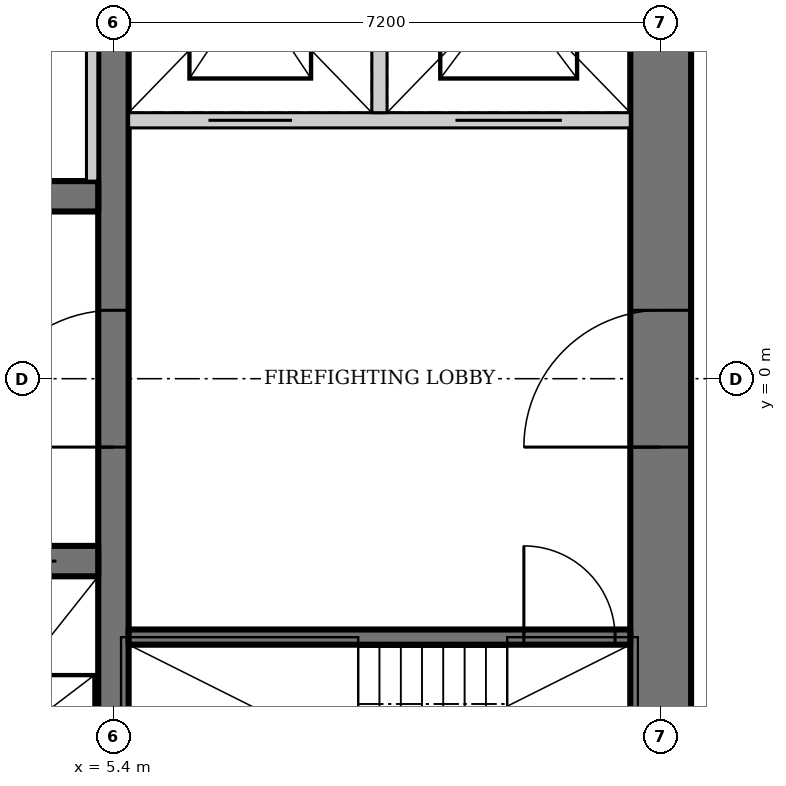
"""IFC4 building model, lengths in metres.
Left out: names, types, materials, properties, quantities, classifications, styles, units other than length and angle.
Written with IfcOpenShell. Run it as: python <this file> out.ifc"""

import sys

from ifc_helpers import new_model, si_unit, direction, frame, frame_2d, origin, place, context, subcontext, project, spatial, rectangle, extrude, element, fill, save


model = new_model("IFC4")
c1 = context("Model", 3, precision=1e-05, world=origin(), true_north=direction((0.0, 1.0)))
c2 = subcontext(c1, "Body", "Model", "MODEL_VIEW")
j1 = project(units=[si_unit("LENGTHUNIT", "METRE"), si_unit("PLANEANGLEUNIT", "RADIAN")], contexts=[c1])
p1 = place(None, origin())
s1 = spatial("IfcSite", under=j1, at=p1, CompositionType="ELEMENT")
p2 = place(p1, origin())
s2 = spatial("IfcBuilding", under=s1, at=p2, CompositionType="ELEMENT")
p3 = place(p2, frame((0.0, 0.0, 279.4)))
s3 = spatial("IfcBuildingStorey", under=s2, at=p3, CompositionType="ELEMENT", Elevation=279.4)
p4 = place(p3, frame((12.6, -11.0, 0.0), z_axis=(0.0, 0.0, 1.0), x_axis=(0.0, 1.0, 0.0)))
e1 = element("IfcWall", 1, at=p4, inside=s3, PredefinedType="SHEAR", context=c2, shape_type="SweptSolid", body=[
    extrude(rectangle(XDim=22.0, YDim=0.8, at=frame_2d((11.0, 0.0))), origin(), (0.0, 0.0, 1.0), 5.0),
])
p5 = place(p4, frame((10.1, 0.0, 0.0)))
e2 = element("IfcOpeningElement", 2, at=p5, cuts=e1, PredefinedType="OPENING", context=c2, shape_type="SweptSolid", body=[
    extrude(rectangle(XDim=1.8, YDim=2.1, at=frame_2d((0.9, 1.05))), frame((0.0, 0.41, 0.0), z_axis=(0.0, -1.0, 0.0), x_axis=(1.0, 0.0, 0.0)), (0.0, 0.0, 1.0), 0.82),
])
p6 = place(p3, frame((5.4, -6.8, 0.0), z_axis=(0.0, 0.0, 1.0), x_axis=(0.0, 1.0, 0.0)))
e3 = element("IfcWall", 3, at=p6, inside=s3, PredefinedType="SHEAR", context=c2, shape_type="SweptSolid", body=[
    extrude(rectangle(XDim=14.6, YDim=0.4, at=frame_2d((7.3, 0.0))), origin(), (0.0, 0.0, 1.0), 5.0),
])
p7 = place(p6, frame((5.9, 0.0, 0.0)))
e4 = element("IfcOpeningElement", 4, at=p7, cuts=e3, PredefinedType="OPENING", context=c2, shape_type="SweptSolid", body=[
    extrude(rectangle(XDim=1.8, YDim=2.1, at=frame_2d((0.9, 1.05))), frame((0.0, 0.21, 0.0), z_axis=(0.0, -1.0, 0.0), x_axis=(1.0, 0.0, 0.0)), (0.0, 0.0, 1.0), 0.42),
])
p8 = place(p3, frame((-5.2, -2.4, 0.0), z_axis=(0.0, 0.0, 1.0), x_axis=(1.0, 0.0, 0.0)))
e5 = element("IfcWall", 5, at=p8, inside=s3, PredefinedType="SHEAR", context=c2, shape_type="SweptSolid", body=[
    extrude(rectangle(XDim=10.4, YDim=0.4, at=frame_2d((5.2, 0.0))), origin(), (0.0, 0.0, 1.0), 5.0),
])
p9 = place(p8, frame((1.683, 0.0, 0.0)))
e6 = element("IfcOpeningElement", 6, at=p9, cuts=e5, PredefinedType="OPENING", context=c2, shape_type="SweptSolid", body=[
    extrude(rectangle(XDim=1.1, YDim=2.2, at=frame_2d((0.55, 1.1))), frame((0.0, 0.21, 0.0), z_axis=(0.0, -1.0, 0.0), x_axis=(1.0, 0.0, 0.0)), (0.0, 0.0, 1.0), 0.42),
])
p10 = place(p8, frame((5.217, 0.0, 0.0)))
e7 = element("IfcOpeningElement", 7, at=p10, cuts=e5, PredefinedType="OPENING", context=c2, shape_type="SweptSolid", body=[
    extrude(rectangle(XDim=1.1, YDim=2.2, at=frame_2d((0.55, 1.1))), frame((0.0, 0.21, 0.0), z_axis=(0.0, -1.0, 0.0), x_axis=(1.0, 0.0, 0.0)), (0.0, 0.0, 1.0), 0.42),
])
p11 = place(p8, frame((8.75, 0.0, 0.0)))
e8 = element("IfcOpeningElement", 8, at=p11, cuts=e5, PredefinedType="OPENING", context=c2, shape_type="SweptSolid", body=[
    extrude(rectangle(XDim=1.1, YDim=2.2, at=frame_2d((0.55, 1.1))), frame((0.0, 0.21, 0.0), z_axis=(0.0, -1.0, 0.0), x_axis=(1.0, 0.0, 0.0)), (0.0, 0.0, 1.0), 0.42),
])
p12 = place(p3, frame((5.2, 2.4, 0.0), z_axis=(0.0, 0.0, 1.0), x_axis=(-1.0, 0.0, 0.0)))
e9 = element("IfcWall", 9, at=p12, inside=s3, PredefinedType="SHEAR", context=c2, shape_type="SweptSolid", body=[
    extrude(rectangle(XDim=10.4, YDim=0.4, at=frame_2d((5.2, 0.0))), origin(), (0.0, 0.0, 1.0), 5.0),
])
p13 = place(p3, frame((5.6, -3.4, 0.0), z_axis=(0.0, 0.0, 1.0), x_axis=(1.0, 0.0, 0.0)))
e10 = element("IfcWall", 10, at=p13, inside=s3, PredefinedType="SHEAR", context=c2, shape_type="SweptSolid", body=[
    extrude(rectangle(XDim=6.6, YDim=0.2, at=frame_2d((3.3, 0.0))), origin(), (0.0, 0.0, 1.0), 5.0),
])
p14 = place(p13, frame((5.2, 0.0, 0.0)))
e11 = element("IfcOpeningElement", 11, at=p14, cuts=e10, PredefinedType="OPENING", context=c2, shape_type="SweptSolid", body=[
    extrude(rectangle(XDim=1.2, YDim=2.1, at=frame_2d((0.6, 1.05))), frame((0.0, 0.11, 0.0), z_axis=(0.0, -1.0, 0.0), x_axis=(1.0, 0.0, 0.0)), (0.0, 0.0, 1.0), 0.22),
])
p15 = place(p3, frame((12.2, 3.4, 0.0), z_axis=(0.0, 0.0, 1.0), x_axis=(-1.0, 0.0, 0.0)))
e12 = element("IfcWall", 12, at=p15, inside=s3, PredefinedType="SOLIDWALL", context=c2, shape_type="SweptSolid", body=[
    extrude(rectangle(XDim=6.6, YDim=0.2, at=frame_2d((3.3, 0.0))), origin(), (0.0, 0.0, 1.0), 5.0),
])
p16 = place(p15, frame((4.45, 0.0, 0.0)))
e13 = element("IfcOpeningElement", 13, at=p16, cuts=e12, PredefinedType="OPENING", context=c2, shape_type="SweptSolid", body=[
    extrude(rectangle(XDim=1.1, YDim=2.2, at=frame_2d((0.55, 1.1))), frame((0.0, 0.11, 0.0), z_axis=(0.0, -1.0, 0.0), x_axis=(1.0, 0.0, 0.0)), (0.0, 0.0, 1.0), 0.22),
])
p17 = place(p15, frame((0.9, 0.0, 0.0)))
e14 = element("IfcOpeningElement", 14, at=p17, cuts=e12, PredefinedType="OPENING", context=c2, shape_type="SweptSolid", body=[
    extrude(rectangle(XDim=1.4, YDim=2.2, at=frame_2d((0.7, 1.1))), frame((0.0, 0.11, 0.0), z_axis=(0.0, -1.0, 0.0), x_axis=(1.0, 0.0, 0.0)), (0.0, 0.0, 1.0), 0.22),
])
p18 = place(p3, frame((8.9, 3.5, 0.0), z_axis=(0.0, 0.0, 1.0), x_axis=(0.0, 1.0, 0.0)))
e15 = element("IfcWall", 15, at=p18, inside=s3, PredefinedType="SOLIDWALL", context=c2, shape_type="SweptSolid", body=[
    extrude(rectangle(XDim=3.3, YDim=0.2, at=frame_2d((1.65, 0.0))), origin(), (0.0, 0.0, 1.0), 5.0),
])
p19 = place(p3, frame((5.12, 2.6, 0.0), z_axis=(0.0, 0.0, 1.0), x_axis=(0.0, 1.0, 0.0)))
e16 = element("IfcWall", 16, at=p19, inside=s3, PredefinedType="PARTITIONING", context=c2, shape_type="SweptSolid", body=[
    extrude(rectangle(XDim=5.2, YDim=0.15, at=frame_2d((2.6, 0.0))), origin(), (0.0, 0.0, 1.0), 4.8),
])
p20 = place(p7, origin())
e17 = element("IfcDoor", 17, at=p20, inside=s3, OperationType="DOUBLE_DOOR_DOUBLE_SWING", PredefinedType="DOOR", context=c2, shape_type="SweptSolid", body=[
    extrude(rectangle(XDim=1.8, YDim=2.1, at=frame_2d((0.9, 1.05))), frame((0.0, 0.025, 0.0), z_axis=(0.0, -1.0, 0.0), x_axis=(1.0, 0.0, 0.0)), (0.0, 0.0, 1.0), 0.05),
])
fill(e4, e17)
p21 = place(p14, origin())
e18 = element("IfcDoor", 18, at=p21, inside=s3, OperationType="SINGLE_SWING_RIGHT", PredefinedType="DOOR", context=c2, shape_type="SweptSolid", body=[
    extrude(rectangle(XDim=1.2, YDim=2.1, at=frame_2d((0.6, 1.05))), frame((0.0, 0.025, 0.0), z_axis=(0.0, -1.0, 0.0), x_axis=(1.0, 0.0, 0.0)), (0.0, 0.0, 1.0), 0.05),
])
fill(e11, e18)
p22 = place(p5, origin())
e19 = element("IfcDoor", 19, at=p22, inside=s3, OperationType="DOUBLE_DOOR_DOUBLE_SWING", PredefinedType="DOOR", context=c2, shape_type="SweptSolid", body=[
    extrude(rectangle(XDim=1.8, YDim=2.1, at=frame_2d((0.9, 1.05))), frame((0.0, 0.025, 0.0), z_axis=(0.0, -1.0, 0.0), x_axis=(1.0, 0.0, 0.0)), (0.0, 0.0, 1.0), 0.05),
])
fill(e2, e19)
p23 = place(p11, origin())
e20 = element("IfcDoor", 20, at=p23, inside=s3, OperationType="DOUBLE_DOOR_SLIDING", PredefinedType="DOOR", context=c2, shape_type="SweptSolid", body=[
    extrude(rectangle(XDim=1.1, YDim=2.2, at=frame_2d((0.55, 1.1))), frame((0.0, 0.025, 0.0), z_axis=(0.0, -1.0, 0.0), x_axis=(1.0, 0.0, 0.0)), (0.0, 0.0, 1.0), 0.05),
])
fill(e8, e20)
p24 = place(p16, origin())
e21 = element("IfcDoor", 21, at=p24, inside=s3, OperationType="DOUBLE_DOOR_SLIDING", PredefinedType="DOOR", context=c2, shape_type="SweptSolid", body=[
    extrude(rectangle(XDim=1.1, YDim=2.2, at=frame_2d((0.55, 1.1))), frame((0.0, 0.025, 0.0), z_axis=(0.0, -1.0, 0.0), x_axis=(1.0, 0.0, 0.0)), (0.0, 0.0, 1.0), 0.05),
])
fill(e13, e21)
p25 = place(p17, origin())
e22 = element("IfcDoor", 22, at=p25, inside=s3, OperationType="DOUBLE_DOOR_SLIDING", PredefinedType="DOOR", context=c2, shape_type="SweptSolid", body=[
    extrude(rectangle(XDim=1.4, YDim=2.2, at=frame_2d((0.7, 1.1))), frame((0.0, 0.025, 0.0), z_axis=(0.0, -1.0, 0.0), x_axis=(1.0, 0.0, 0.0)), (0.0, 0.0, 1.0), 0.05),
])
fill(e14, e22)
save(model, sys.argv[1])
